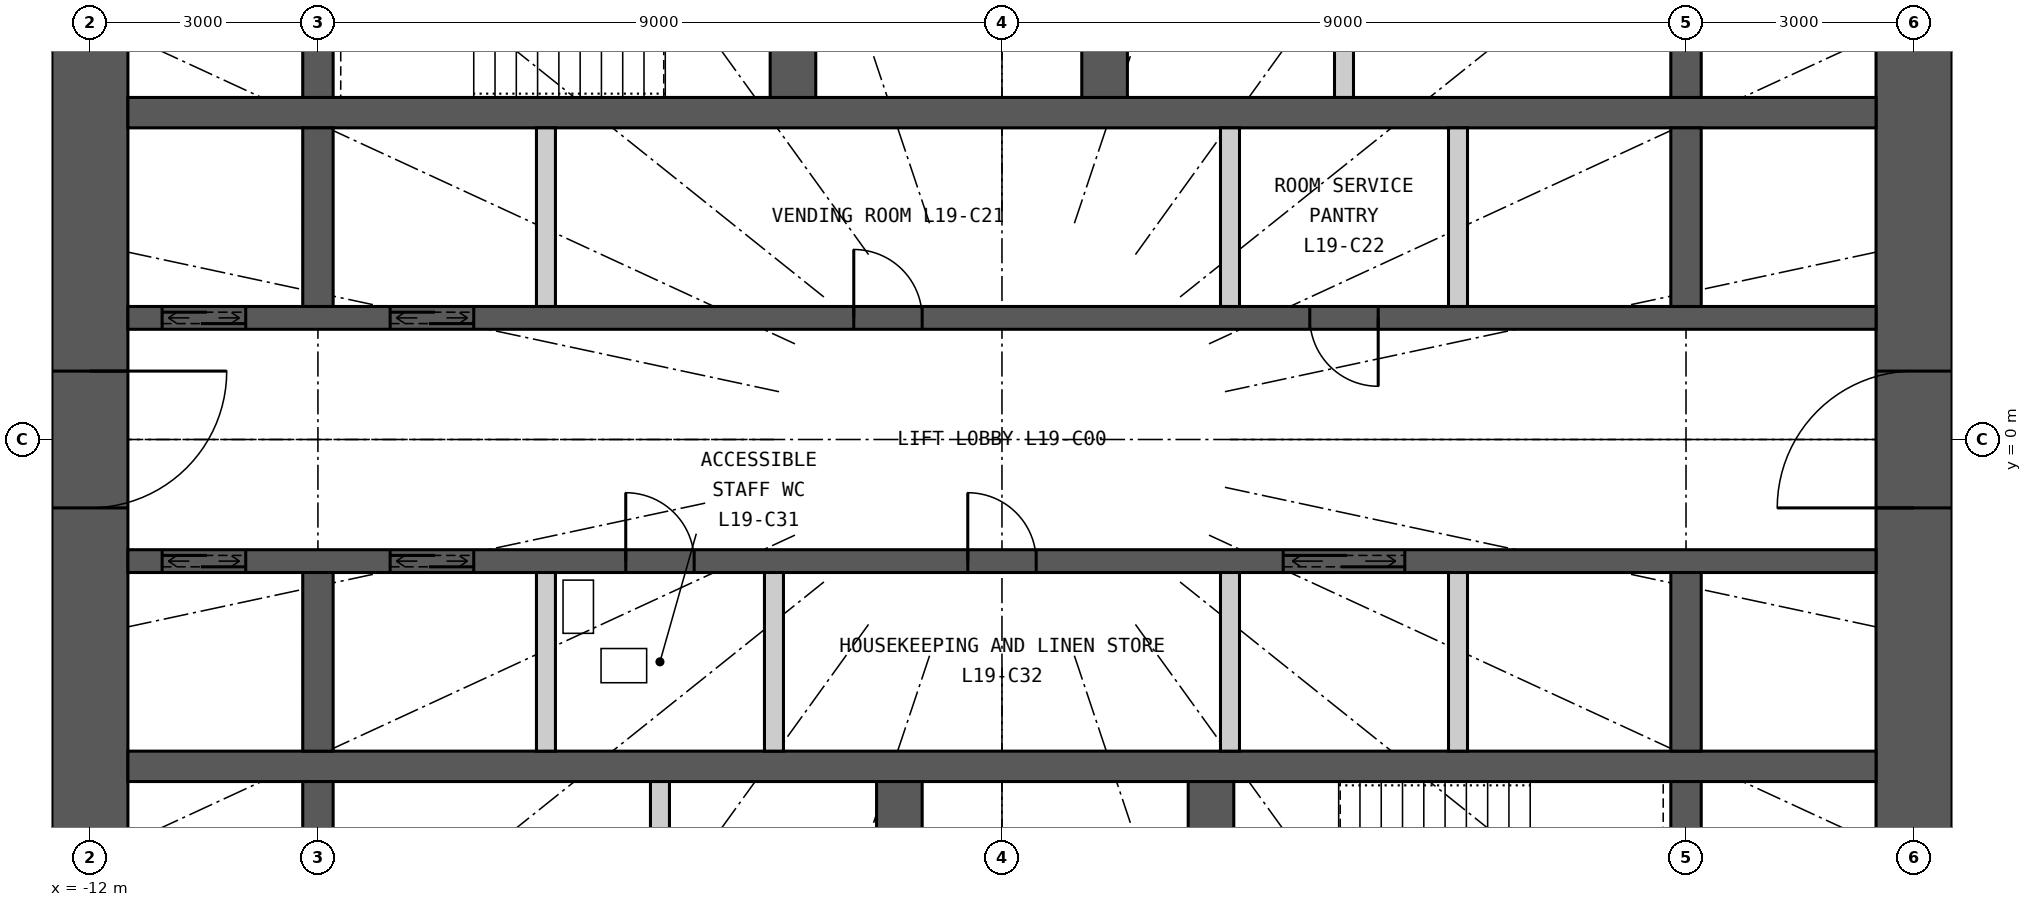
"""IFC4 building model, lengths in metres.
Left out: names, types, materials, properties, quantities, classifications, styles, units other than length and angle.
Written with IfcOpenShell. Run it as: python <this file> out.ifc"""

import sys

from ifc_helpers import new_model, si_unit, direction, frame, frame_2d, origin, place, context, subcontext, project, spatial, rectangle, extrude, element, fill, save


model = new_model("IFC4")
c1 = context("Model", 3, precision=1e-05, world=origin(), true_north=direction((0.0, 1.0)))
c2 = subcontext(c1, "Body", "Model", "MODEL_VIEW")
j1 = project(units=[si_unit("LENGTHUNIT", "METRE"), si_unit("PLANEANGLEUNIT", "RADIAN")], contexts=[c1])
p1 = place(None, origin())
s1 = spatial("IfcSite", under=j1, at=p1, CompositionType="ELEMENT")
p2 = place(p1, origin())
s2 = spatial("IfcBuilding", under=s1, at=p2, CompositionType="ELEMENT")
p3 = place(p2, frame((0.0, 0.0, 77.1)))
s3 = spatial("IfcBuildingStorey", under=s2, at=p3, CompositionType="ELEMENT", Elevation=77.1)
p4 = place(p3, frame((12.0, -7.5, 0.0), z_axis=(0.0, 0.0, 1.0), x_axis=(0.0, 1.0, 0.0)))
e1 = element("IfcWall", 1, at=p4, inside=s3, PredefinedType="SHEAR", context=c2, shape_type="SweptSolid", body=[
    extrude(rectangle(XDim=15.0, YDim=1.0, at=frame_2d((7.5, 0.0))), origin(), (0.0, 0.0, 1.0), 3.3),
])
p5 = place(p4, frame((6.6, 0.0, 0.0)))
e2 = element("IfcOpeningElement", 2, at=p5, cuts=e1, PredefinedType="OPENING", context=c2, shape_type="SweptSolid", body=[
    extrude(rectangle(XDim=1.8, YDim=2.2, at=frame_2d((0.9, 1.1))), frame((0.0, 0.51, 0.0), z_axis=(0.0, -1.0, 0.0), x_axis=(1.0, 0.0, 0.0)), (0.0, 0.0, 1.0), 1.02),
])
p6 = place(p3, frame((-12.0, 7.5, 0.0), z_axis=(0.0, 0.0, 1.0), x_axis=(0.0, -1.0, 0.0)))
e3 = element("IfcWall", 3, at=p6, inside=s3, PredefinedType="SHEAR", context=c2, shape_type="SweptSolid", body=[
    extrude(rectangle(XDim=15.0, YDim=1.0, at=frame_2d((7.5, 0.0))), origin(), (0.0, 0.0, 1.0), 3.3),
])
p7 = place(p6, frame((6.6, 0.0, 0.0)))
e4 = element("IfcOpeningElement", 4, at=p7, cuts=e3, PredefinedType="OPENING", context=c2, shape_type="SweptSolid", body=[
    extrude(rectangle(XDim=1.8, YDim=2.2, at=frame_2d((0.9, 1.1))), frame((0.0, 0.51, 0.0), z_axis=(0.0, -1.0, 0.0), x_axis=(1.0, 0.0, 0.0)), (0.0, 0.0, 1.0), 1.02),
])
p8 = place(p3, frame((-11.5, 4.3, 0.0), z_axis=(0.0, 0.0, 1.0), x_axis=(1.0, 0.0, 0.0)))
e5 = element("IfcWall", 5, at=p8, inside=s3, PredefinedType="SHEAR", context=c2, shape_type="SweptSolid", body=[
    extrude(rectangle(XDim=23.0, YDim=0.4, at=frame_2d((11.5, 0.0))), origin(), (0.0, 0.0, 1.0), 3.3),
])
p9 = place(p3, frame((-11.5, 1.6, 0.0), z_axis=(0.0, 0.0, 1.0), x_axis=(1.0, 0.0, 0.0)))
e6 = element("IfcWall", 6, at=p9, inside=s3, PredefinedType="SHEAR", context=c2, shape_type="SweptSolid", body=[
    extrude(rectangle(XDim=23.0, YDim=0.3, at=frame_2d((11.5, 0.0))), origin(), (0.0, 0.0, 1.0), 3.3),
])
p10 = place(p9, frame((0.45, 0.0, 0.0)))
e7 = element("IfcOpeningElement", 7, at=p10, cuts=e6, PredefinedType="OPENING", context=c2, shape_type="SweptSolid", body=[
    extrude(rectangle(XDim=1.1, YDim=2.2, at=frame_2d((0.55, 1.1))), frame((0.0, 0.16, 0.0), z_axis=(0.0, -1.0, 0.0), x_axis=(1.0, 0.0, 0.0)), (0.0, 0.0, 1.0), 0.32),
])
p11 = place(p9, frame((3.45, 0.0, 0.0)))
e8 = element("IfcOpeningElement", 8, at=p11, cuts=e6, PredefinedType="OPENING", context=c2, shape_type="SweptSolid", body=[
    extrude(rectangle(XDim=1.1, YDim=2.2, at=frame_2d((0.55, 1.1))), frame((0.0, 0.16, 0.0), z_axis=(0.0, -1.0, 0.0), x_axis=(1.0, 0.0, 0.0)), (0.0, 0.0, 1.0), 0.32),
])
p12 = place(p9, frame((9.55, 0.0, 0.0)))
e9 = element("IfcOpeningElement", 9, at=p12, cuts=e6, PredefinedType="OPENING", context=c2, shape_type="SweptSolid", body=[
    extrude(rectangle(XDim=0.9, YDim=2.2, at=frame_2d((0.45, 1.1))), frame((0.0, 0.16, 0.0), z_axis=(0.0, -1.0, 0.0), x_axis=(1.0, 0.0, 0.0)), (0.0, 0.0, 1.0), 0.32),
])
p13 = place(p9, frame((15.55, 0.0, 0.0)))
e10 = element("IfcOpeningElement", 10, at=p13, cuts=e6, PredefinedType="OPENING", context=c2, shape_type="SweptSolid", body=[
    extrude(rectangle(XDim=0.9, YDim=2.2, at=frame_2d((0.45, 1.1))), frame((0.0, 0.16, 0.0), z_axis=(0.0, -1.0, 0.0), x_axis=(1.0, 0.0, 0.0)), (0.0, 0.0, 1.0), 0.32),
])
p14 = place(p3, frame((-11.5, -4.3, 0.0), z_axis=(0.0, 0.0, 1.0), x_axis=(1.0, 0.0, 0.0)))
e11 = element("IfcWall", 11, at=p14, inside=s3, PredefinedType="SHEAR", context=c2, shape_type="SweptSolid", body=[
    extrude(rectangle(XDim=23.0, YDim=0.4, at=frame_2d((11.5, 0.0))), origin(), (0.0, 0.0, 1.0), 3.3),
])
p15 = place(p3, frame((-11.5, -1.6, 0.0), z_axis=(0.0, 0.0, 1.0), x_axis=(1.0, 0.0, 0.0)))
e12 = element("IfcWall", 12, at=p15, inside=s3, PredefinedType="SHEAR", context=c2, shape_type="SweptSolid", body=[
    extrude(rectangle(XDim=23.0, YDim=0.3, at=frame_2d((11.5, 0.0))), origin(), (0.0, 0.0, 1.0), 3.3),
])
p16 = place(p15, frame((0.45, 0.0, 0.0)))
e13 = element("IfcOpeningElement", 13, at=p16, cuts=e12, PredefinedType="OPENING", context=c2, shape_type="SweptSolid", body=[
    extrude(rectangle(XDim=1.1, YDim=2.2, at=frame_2d((0.55, 1.1))), frame((0.0, 0.16, 0.0), z_axis=(0.0, -1.0, 0.0), x_axis=(1.0, 0.0, 0.0)), (0.0, 0.0, 1.0), 0.32),
])
p17 = place(p15, frame((3.45, 0.0, 0.0)))
e14 = element("IfcOpeningElement", 14, at=p17, cuts=e12, PredefinedType="OPENING", context=c2, shape_type="SweptSolid", body=[
    extrude(rectangle(XDim=1.1, YDim=2.2, at=frame_2d((0.55, 1.1))), frame((0.0, 0.16, 0.0), z_axis=(0.0, -1.0, 0.0), x_axis=(1.0, 0.0, 0.0)), (0.0, 0.0, 1.0), 0.32),
])
p18 = place(p15, frame((15.2, 0.0, 0.0)))
e15 = element("IfcOpeningElement", 15, at=p18, cuts=e12, PredefinedType="OPENING", context=c2, shape_type="SweptSolid", body=[
    extrude(rectangle(XDim=1.6, YDim=2.4, at=frame_2d((0.8, 1.2))), frame((0.0, 0.16, 0.0), z_axis=(0.0, -1.0, 0.0), x_axis=(1.0, 0.0, 0.0)), (0.0, 0.0, 1.0), 0.32),
])
p19 = place(p15, frame((6.55, 0.0, 0.0)))
e16 = element("IfcOpeningElement", 16, at=p19, cuts=e12, PredefinedType="OPENING", context=c2, shape_type="SweptSolid", body=[
    extrude(rectangle(XDim=0.9, YDim=2.2, at=frame_2d((0.45, 1.1))), frame((0.0, 0.16, 0.0), z_axis=(0.0, -1.0, 0.0), x_axis=(1.0, 0.0, 0.0)), (0.0, 0.0, 1.0), 0.32),
])
p20 = place(p15, frame((11.05, 0.0, 0.0)))
e17 = element("IfcOpeningElement", 17, at=p20, cuts=e12, PredefinedType="OPENING", context=c2, shape_type="SweptSolid", body=[
    extrude(rectangle(XDim=0.9, YDim=2.2, at=frame_2d((0.45, 1.1))), frame((0.0, 0.16, 0.0), z_axis=(0.0, -1.0, 0.0), x_axis=(1.0, 0.0, 0.0)), (0.0, 0.0, 1.0), 0.32),
])
p21 = place(p3, frame((-9.0, 4.5, 0.0), z_axis=(0.0, 0.0, 1.0), x_axis=(0.0, 1.0, 0.0)))
e18 = element("IfcWall", 18, at=p21, inside=s3, PredefinedType="SHEAR", context=c2, shape_type="SweptSolid", body=[
    extrude(rectangle(XDim=3.0, YDim=0.4, at=frame_2d((1.5, 0.0))), origin(), (0.0, 0.0, 1.0), 3.3),
])
for number, where, z_axis, x_axis in (
    (19, (-9.0, 1.75, 0.0), (0.0, 0.0, 1.0), (0.0, 1.0, 0.0)),
    (20, (-9.0, -4.1, 0.0), (0.0, 0.0, 1.0), (0.0, 1.0, 0.0)),
):
    element("IfcWall", number, at=place(p3, frame(where, z_axis=z_axis, x_axis=x_axis)), inside=s3, PredefinedType="SHEAR", context=c2, shape_type="SweptSolid", body=[
        extrude(rectangle(XDim=2.35, YDim=0.4, at=frame_2d((1.175, 0.0))), origin(), (0.0, 0.0, 1.0), 3.3),
    ])
for number, where, z_axis, x_axis in (
    (21, (-9.0, -7.5, 0.0), (0.0, 0.0, 1.0), (0.0, 1.0, 0.0)),
    (22, (9.0, 4.5, 0.0), (0.0, 0.0, 1.0), (0.0, 1.0, 0.0)),
):
    element("IfcWall", number, at=place(p3, frame(where, z_axis=z_axis, x_axis=x_axis)), inside=s3, PredefinedType="SHEAR", context=c2, shape_type="SweptSolid", body=[
        extrude(rectangle(XDim=3.0, YDim=0.4, at=frame_2d((1.5, 0.0))), origin(), (0.0, 0.0, 1.0), 3.3),
    ])
for number, where, z_axis, x_axis in (
    (23, (9.0, 1.75, 0.0), (0.0, 0.0, 1.0), (0.0, 1.0, 0.0)),
    (24, (9.0, -4.1, 0.0), (0.0, 0.0, 1.0), (0.0, 1.0, 0.0)),
):
    element("IfcWall", number, at=place(p3, frame(where, z_axis=z_axis, x_axis=x_axis)), inside=s3, PredefinedType="SHEAR", context=c2, shape_type="SweptSolid", body=[
        extrude(rectangle(XDim=2.35, YDim=0.4, at=frame_2d((1.175, 0.0))), origin(), (0.0, 0.0, 1.0), 3.3),
    ])
p22 = place(p3, frame((9.0, -7.5, 0.0), z_axis=(0.0, 0.0, 1.0), x_axis=(0.0, 1.0, 0.0)))
e25 = element("IfcWall", 25, at=p22, inside=s3, PredefinedType="SHEAR", context=c2, shape_type="SweptSolid", body=[
    extrude(rectangle(XDim=3.0, YDim=0.4, at=frame_2d((1.5, 0.0))), origin(), (0.0, 0.0, 1.0), 3.3),
])
p23 = place(p3, frame((-2.75, 4.5, 0.0), z_axis=(0.0, 0.0, 1.0), x_axis=(0.0, 1.0, 0.0)))
e26 = element("IfcWall", 26, at=p23, inside=s3, PredefinedType="SHEAR", context=c2, shape_type="SweptSolid", body=[
    extrude(rectangle(XDim=3.0, YDim=0.6, at=frame_2d((1.5, 0.0))), origin(), (0.0, 0.0, 1.0), 3.3),
])
p24 = place(p23, frame((0.925, 0.0, 0.0)))
e27 = element("IfcOpeningElement", 27, at=p24, cuts=e26, PredefinedType="OPENING", context=c2, shape_type="SweptSolid", body=[
    extrude(rectangle(XDim=1.1, YDim=2.2, at=frame_2d((0.55, 1.1))), frame((0.0, 0.31, 0.0), z_axis=(0.0, -1.0, 0.0), x_axis=(1.0, 0.0, 0.0)), (0.0, 0.0, 1.0), 0.62),
])
p25 = place(p3, frame((1.35, 4.5, 0.0), z_axis=(0.0, 0.0, 1.0), x_axis=(0.0, 1.0, 0.0)))
e28 = element("IfcWall", 28, at=p25, inside=s3, PredefinedType="SHEAR", context=c2, shape_type="SweptSolid", body=[
    extrude(rectangle(XDim=3.0, YDim=0.6, at=frame_2d((1.5, 0.0))), origin(), (0.0, 0.0, 1.0), 3.3),
])
p26 = place(p25, frame((0.95, 0.0, 0.0)))
e29 = element("IfcOpeningElement", 29, at=p26, cuts=e28, PredefinedType="OPENING", context=c2, shape_type="SweptSolid", body=[
    extrude(rectangle(XDim=1.1, YDim=2.2, at=frame_2d((0.55, 1.1))), frame((0.0, 0.31, 0.0), z_axis=(0.0, -1.0, 0.0), x_axis=(1.0, 0.0, 0.0)), (0.0, 0.0, 1.0), 0.62),
])
p27 = place(p3, frame((4.5, 4.5, 0.0), z_axis=(0.0, 0.0, 1.0), x_axis=(0.0, 1.0, 0.0)))
e30 = element("IfcWall", 30, at=p27, inside=s3, PredefinedType="PARTITIONING", context=c2, shape_type="SweptSolid", body=[
    extrude(rectangle(XDim=3.0, YDim=0.25, at=frame_2d((1.5, 0.0))), origin(), (0.0, 0.0, 1.0), 3.3),
])
p28 = place(p3, frame((2.75, -7.5, 0.0), z_axis=(0.0, 0.0, 1.0), x_axis=(0.0, 1.0, 0.0)))
e31 = element("IfcWall", 31, at=p28, inside=s3, PredefinedType="SHEAR", context=c2, shape_type="SweptSolid", body=[
    extrude(rectangle(XDim=3.0, YDim=0.6, at=frame_2d((1.5, 0.0))), origin(), (0.0, 0.0, 1.0), 3.3),
])
p29 = place(p28, frame((0.975, 0.0, 0.0)))
e32 = element("IfcOpeningElement", 32, at=p29, cuts=e31, PredefinedType="OPENING", context=c2, shape_type="SweptSolid", body=[
    extrude(rectangle(XDim=1.1, YDim=2.2, at=frame_2d((0.55, 1.1))), frame((0.0, 0.31, 0.0), z_axis=(0.0, -1.0, 0.0), x_axis=(1.0, 0.0, 0.0)), (0.0, 0.0, 1.0), 0.62),
])
p30 = place(p3, frame((-1.35, -7.5, 0.0), z_axis=(0.0, 0.0, 1.0), x_axis=(0.0, 1.0, 0.0)))
e33 = element("IfcWall", 33, at=p30, inside=s3, PredefinedType="SHEAR", context=c2, shape_type="SweptSolid", body=[
    extrude(rectangle(XDim=3.0, YDim=0.6, at=frame_2d((1.5, 0.0))), origin(), (0.0, 0.0, 1.0), 3.3),
])
p31 = place(p30, frame((0.95, 0.0, 0.0)))
e34 = element("IfcOpeningElement", 34, at=p31, cuts=e33, PredefinedType="OPENING", context=c2, shape_type="SweptSolid", body=[
    extrude(rectangle(XDim=1.1, YDim=2.2, at=frame_2d((0.55, 1.1))), frame((0.0, 0.31, 0.0), z_axis=(0.0, -1.0, 0.0), x_axis=(1.0, 0.0, 0.0)), (0.0, 0.0, 1.0), 0.62),
])
p32 = place(p3, frame((-4.5, -7.5, 0.0), z_axis=(0.0, 0.0, 1.0), x_axis=(0.0, 1.0, 0.0)))
e35 = element("IfcWall", 35, at=p32, inside=s3, PredefinedType="PARTITIONING", context=c2, shape_type="SweptSolid", body=[
    extrude(rectangle(XDim=3.0, YDim=0.25, at=frame_2d((1.5, 0.0))), origin(), (0.0, 0.0, 1.0), 3.3),
])
for number, where, z_axis, x_axis in (
    (36, (-6.0, 1.75, 0.0), (0.0, 0.0, 1.0), (0.0, 1.0, 0.0)),
    (37, (3.0, 1.75, 0.0), (0.0, 0.0, 1.0), (0.0, 1.0, 0.0)),
    (38, (6.0, 1.75, 0.0), (0.0, 0.0, 1.0), (0.0, 1.0, 0.0)),
    (39, (-6.0, -4.1, 0.0), (0.0, 0.0, 1.0), (0.0, 1.0, 0.0)),
    (40, (-3.0, -4.1, 0.0), (0.0, 0.0, 1.0), (0.0, 1.0, 0.0)),
    (41, (3.0, -4.1, 0.0), (0.0, 0.0, 1.0), (0.0, 1.0, 0.0)),
    (42, (6.0, -4.1, 0.0), (0.0, 0.0, 1.0), (0.0, 1.0, 0.0)),
):
    element("IfcWall", number, at=place(p3, frame(where, z_axis=z_axis, x_axis=x_axis)), inside=s3, PredefinedType="PARTITIONING", context=c2, shape_type="SweptSolid", body=[
        extrude(rectangle(XDim=2.35, YDim=0.25, at=frame_2d((1.175, 0.0))), origin(), (0.0, 0.0, 1.0), 3.3),
    ])
p33 = place(p10, origin())
e43 = element("IfcDoor", 43, at=p33, inside=s3, OperationType="DOUBLE_DOOR_SLIDING", PredefinedType="DOOR", context=c2, shape_type="SweptSolid", body=[
    extrude(rectangle(XDim=1.1, YDim=2.2, at=frame_2d((0.55, 1.1))), frame((0.0, 0.025, 0.0), z_axis=(0.0, -1.0, 0.0), x_axis=(1.0, 0.0, 0.0)), (0.0, 0.0, 1.0), 0.05),
])
fill(e7, e43)
p34 = place(p11, origin())
e44 = element("IfcDoor", 44, at=p34, inside=s3, OperationType="DOUBLE_DOOR_SLIDING", PredefinedType="DOOR", context=c2, shape_type="SweptSolid", body=[
    extrude(rectangle(XDim=1.1, YDim=2.2, at=frame_2d((0.55, 1.1))), frame((0.0, 0.025, 0.0), z_axis=(0.0, -1.0, 0.0), x_axis=(1.0, 0.0, 0.0)), (0.0, 0.0, 1.0), 0.05),
])
fill(e8, e44)
p35 = place(p16, origin())
e45 = element("IfcDoor", 45, at=p35, inside=s3, OperationType="DOUBLE_DOOR_SLIDING", PredefinedType="DOOR", context=c2, shape_type="SweptSolid", body=[
    extrude(rectangle(XDim=1.1, YDim=2.2, at=frame_2d((0.55, 1.1))), frame((0.0, 0.025, 0.0), z_axis=(0.0, -1.0, 0.0), x_axis=(1.0, 0.0, 0.0)), (0.0, 0.0, 1.0), 0.05),
])
fill(e13, e45)
p36 = place(p17, origin())
e46 = element("IfcDoor", 46, at=p36, inside=s3, OperationType="DOUBLE_DOOR_SLIDING", PredefinedType="DOOR", context=c2, shape_type="SweptSolid", body=[
    extrude(rectangle(XDim=1.1, YDim=2.2, at=frame_2d((0.55, 1.1))), frame((0.0, 0.025, 0.0), z_axis=(0.0, -1.0, 0.0), x_axis=(1.0, 0.0, 0.0)), (0.0, 0.0, 1.0), 0.05),
])
fill(e14, e46)
p37 = place(p18, origin())
e47 = element("IfcDoor", 47, at=p37, inside=s3, OperationType="DOUBLE_DOOR_SLIDING", PredefinedType="DOOR", context=c2, shape_type="SweptSolid", body=[
    extrude(rectangle(XDim=1.6, YDim=2.4, at=frame_2d((0.8, 1.2))), frame((0.0, 0.025, 0.0), z_axis=(0.0, -1.0, 0.0), x_axis=(1.0, 0.0, 0.0)), (0.0, 0.0, 1.0), 0.05),
])
fill(e15, e47)
p38 = place(p12, origin())
e48 = element("IfcDoor", 48, at=p38, inside=s3, OperationType="SINGLE_SWING_LEFT", PredefinedType="DOOR", context=c2, shape_type="SweptSolid", body=[
    extrude(rectangle(XDim=0.9, YDim=2.2, at=frame_2d((0.45, 1.1))), frame((0.0, 0.025, 0.0), z_axis=(0.0, -1.0, 0.0), x_axis=(1.0, 0.0, 0.0)), (0.0, 0.0, 1.0), 0.05),
])
fill(e9, e48)
p39 = place(p13, origin())
e49 = element("IfcDoor", 49, at=p39, inside=s3, OperationType="SINGLE_SWING_RIGHT", PredefinedType="DOOR", context=c2, shape_type="SweptSolid", body=[
    extrude(rectangle(XDim=0.9, YDim=2.2, at=frame_2d((0.45, 1.1))), frame((0.0, 0.025, 0.0), z_axis=(0.0, -1.0, 0.0), x_axis=(1.0, 0.0, 0.0)), (0.0, 0.0, 1.0), 0.05),
])
fill(e10, e49)
p40 = place(p19, origin())
e50 = element("IfcDoor", 50, at=p40, inside=s3, OperationType="SINGLE_SWING_LEFT", PredefinedType="DOOR", context=c2, shape_type="SweptSolid", body=[
    extrude(rectangle(XDim=0.9, YDim=2.2, at=frame_2d((0.45, 1.1))), frame((0.0, 0.025, 0.0), z_axis=(0.0, -1.0, 0.0), x_axis=(1.0, 0.0, 0.0)), (0.0, 0.0, 1.0), 0.05),
])
fill(e16, e50)
p41 = place(p20, origin())
e51 = element("IfcDoor", 51, at=p41, inside=s3, OperationType="SINGLE_SWING_LEFT", PredefinedType="DOOR", context=c2, shape_type="SweptSolid", body=[
    extrude(rectangle(XDim=0.9, YDim=2.2, at=frame_2d((0.45, 1.1))), frame((0.0, 0.025, 0.0), z_axis=(0.0, -1.0, 0.0), x_axis=(1.0, 0.0, 0.0)), (0.0, 0.0, 1.0), 0.05),
])
fill(e17, e51)
p42 = place(p5, origin())
e52 = element("IfcDoor", 52, at=p42, inside=s3, OperationType="DOUBLE_DOOR_DOUBLE_SWING", PredefinedType="DOOR", context=c2, shape_type="SweptSolid", body=[
    extrude(rectangle(XDim=1.8, YDim=2.2, at=frame_2d((0.9, 1.1))), frame((0.0, 0.025, 0.0), z_axis=(0.0, -1.0, 0.0), x_axis=(1.0, 0.0, 0.0)), (0.0, 0.0, 1.0), 0.05),
])
fill(e2, e52)
p43 = place(p7, origin())
e53 = element("IfcDoor", 53, at=p43, inside=s3, OperationType="DOUBLE_DOOR_DOUBLE_SWING", PredefinedType="DOOR", context=c2, shape_type="SweptSolid", body=[
    extrude(rectangle(XDim=1.8, YDim=2.2, at=frame_2d((0.9, 1.1))), frame((0.0, 0.025, 0.0), z_axis=(0.0, -1.0, 0.0), x_axis=(1.0, 0.0, 0.0)), (0.0, 0.0, 1.0), 0.05),
])
fill(e4, e53)
save(model, sys.argv[1])
